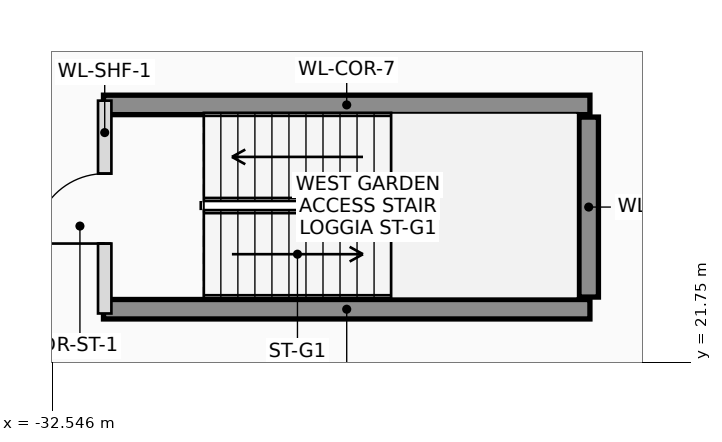
"""IFC4 building model, lengths in metres.
Left out: names, types, materials, properties, quantities, classifications, styles, units other than length and angle.
Written with IfcOpenShell. Run it as: python <this file> out.ifc"""

import sys

from ifc_helpers import new_model, si_unit, direction, frame, frame_2d, origin, place, context, subcontext, project, spatial, rectangle, extrude, element, fill, save


model = new_model("IFC4")
c1 = context("Model", 3, precision=1e-05, world=origin(), true_north=direction((0.0, 1.0)))
c2 = subcontext(c1, "Body", "Model", "MODEL_VIEW")
j1 = project(units=[si_unit("LENGTHUNIT", "METRE"), si_unit("PLANEANGLEUNIT", "RADIAN")], contexts=[c1])
p1 = place(None, origin())
s1 = spatial("IfcSite", under=j1, at=p1, CompositionType="ELEMENT")
p2 = place(p1, origin())
s2 = spatial("IfcBuilding", under=s1, at=p2, CompositionType="ELEMENT")
p3 = place(p2, frame((0.0, 0.0, 8.4)))
s3 = spatial("IfcBuildingStorey", under=s2, at=p3, CompositionType="ELEMENT", Elevation=8.4)
for number, where, z_axis, x_axis in (
    (1, (-31.7, 25.98, 0.0), (0.0, 0.0, 1.0), (1.0, 0.0, 0.0)),
    (2, (-31.7, 22.62, 0.0), (0.0, 0.0, 1.0), (1.0, 0.0, 0.0)),
):
    element("IfcWall", number, at=place(p3, frame(where, z_axis=z_axis, x_axis=x_axis)), inside=s3, PredefinedType="SHEAR", context=c2, shape_type="SweptSolid", body=[
        extrude(rectangle(XDim=8.0, YDim=0.32, at=frame_2d((4.0, 0.0))), origin(), (0.0, 0.0, 1.0), 3.9),
    ])
p4 = place(p3, frame((-23.72, 22.82, 0.0), z_axis=(0.0, 0.0, 1.0), x_axis=(0.0, 1.0, 0.0)))
e3 = element("IfcWall", 3, at=p4, inside=s3, PredefinedType="SHEAR", context=c2, shape_type="SweptSolid", body=[
    extrude(rectangle(XDim=2.96, YDim=0.32, at=frame_2d((1.48, 0.0))), origin(), (0.0, 0.0, 1.0), 3.9),
])
p5 = place(p3, frame((-31.68, 22.55, 0.0), z_axis=(0.0, 0.0, 1.0), x_axis=(0.0, 1.0, 0.0)))
e4 = element("IfcWall", 4, at=p5, inside=s3, PredefinedType="PLUMBINGWALL", context=c2, shape_type="SweptSolid", body=[
    extrude(rectangle(XDim=3.5, YDim=0.22, at=frame_2d((1.75, 0.0))), origin(), (0.0, 0.0, 1.0), 3.57),
])
p6 = place(p5, frame((1.15, 0.0, 0.0)))
e5 = element("IfcOpeningElement", 5, at=p6, cuts=e4, PredefinedType="OPENING", context=c2, shape_type="SweptSolid", body=[
    extrude(rectangle(XDim=1.15, YDim=2.15, at=frame_2d((0.575, 1.075))), frame((0.0, 0.12, 0.0), z_axis=(0.0, -1.0, 0.0), x_axis=(1.0, 0.0, 0.0)), (0.0, 0.0, 1.0), 0.24),
])
p7 = place(p6, origin())
e6 = element("IfcDoor", 6, at=p7, inside=s3, OperationType="SINGLE_SWING_LEFT", PredefinedType="DOOR", context=c2, shape_type="SweptSolid", body=[
    extrude(rectangle(XDim=1.15, YDim=2.15, at=frame_2d((0.575, 1.075))), frame((0.0, 0.025, 0.0), z_axis=(0.0, -1.0, 0.0), x_axis=(1.0, 0.0, 0.0)), (0.0, 0.0, 1.0), 0.05),
])
fill(e5, e6)
save(model, sys.argv[1])
